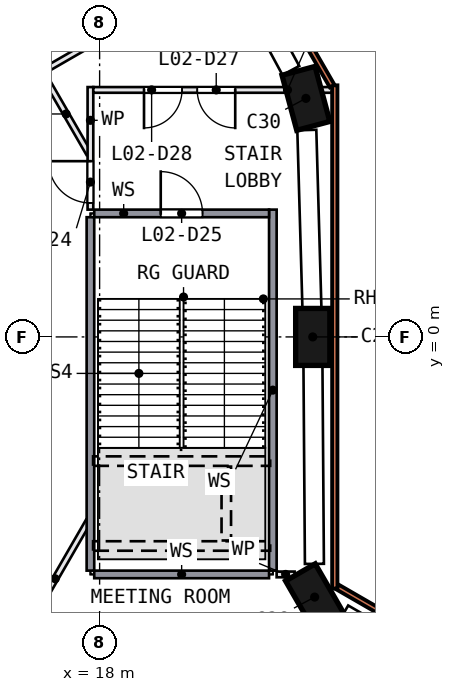
"""IFC4 building model, lengths in metres.
Left out: names, types, materials, properties, quantities, classifications, styles, units other than length and angle.
Written with IfcOpenShell. Run it as: python <this file> out.ifc"""

import sys

from ifc_helpers import new_model, si_unit, direction, frame, frame_2d, origin, origin_2d, place, context, subcontext, project, spatial, rectangle, extrude, element, fill, save


model = new_model("IFC4")
c1 = context("Model", 3, precision=1e-05, world=origin(), true_north=direction((0.0, 1.0)))
c2 = subcontext(c1, "Body", "Model", "MODEL_VIEW")
j1 = project(units=[si_unit("LENGTHUNIT", "METRE"), si_unit("PLANEANGLEUNIT", "RADIAN")], contexts=[c1])
p1 = place(None, origin())
s1 = spatial("IfcSite", under=j1, at=p1, CompositionType="ELEMENT")
p2 = place(p1, origin())
s2 = spatial("IfcBuilding", under=s1, at=p2, CompositionType="ELEMENT")
p3 = place(p2, frame((0.0, 0.0, 14.0)))
s3 = spatial("IfcBuildingStorey", under=s2, at=p3, CompositionType="ELEMENT", Elevation=14.0)
for number, where, z_axis, x_axis in (
    (1, (23.658, -6.846, 0.0), (0.0, 0.0, 1.0), (0.5, -0.866, 0.0)),
    (2, (23.608, 0.0, 0.0), (0.0, 0.0, 1.0), (0.0, 1.0, 0.0)),
    (3, (23.428, 6.278, 0.0), (0.0, 0.0, 1.0), (0.259, -0.966, 0.0)),
):
    element("IfcColumn", number, at=place(p3, frame(where, z_axis=z_axis, x_axis=x_axis)), inside=s3, PredefinedType="COLUMN", context=c2, shape_type="SweptSolid", body=[
        extrude(rectangle(XDim=1.5, YDim=0.9, at=origin_2d()), origin(), (0.0, 0.0, 1.0), 4.55),
    ])
p4 = place(p3, frame((33.751, -12.062, 0.0), z_axis=(0.0, 0.0, 1.0), x_axis=(-0.86602647, 0.499998154, 0.0)))
e4 = element("IfcWall", 4, at=p4, inside=s3, PredefinedType="SOLIDWALL", context=c2, shape_type="SweptSolid", body=[
    extrude(rectangle(XDim=10.961, YDim=0.14, at=frame_2d((5.481, 0.0))), origin(), (0.0, 0.0, 1.0), 4.55),
])
p5 = place(p4, frame((6.702, 0.0, 0.9)))
e5 = element("IfcOpeningElement", 5, at=p5, cuts=e4, PredefinedType="OPENING", context=c2, shape_type="SweptSolid", body=[
    extrude(rectangle(XDim=3.0, YDim=2.7, at=frame_2d((1.5, 1.35))), frame((0.0, 0.08, 0.0), z_axis=(0.0, -1.0, 0.0), x_axis=(1.0, 0.0, 0.0)), (0.0, 0.0, 1.0), 0.16),
])
p6 = place(p3, frame((24.188, -6.621, 0.0), z_axis=(0.0, 0.0, 1.0), x_axis=(0.0, 1.0, 0.0)))
e6 = element("IfcWall", 6, at=p6, inside=s3, PredefinedType="SOLIDWALL", context=c2, shape_type="SweptSolid", body=[
    extrude(rectangle(XDim=13.242, YDim=0.14, at=frame_2d((6.621, 0.0))), origin(), (0.0, 0.0, 1.0), 4.55),
])
p7 = place(p3, frame((24.118, 6.603, 0.0), z_axis=(0.0, 0.0, 1.0), x_axis=(-0.499997984, 0.866026568, 0.0)))
e7 = element("IfcWall", 7, at=p7, inside=s3, PredefinedType="SOLIDWALL", context=c2, shape_type="SweptSolid", body=[
    extrude(rectangle(XDim=12.962, YDim=0.14, at=frame_2d((6.481, 0.0))), origin(), (0.0, 0.0, 1.0), 4.55),
])
p8 = place(p3, frame((16.517, 6.909, 0.0), z_axis=(0.0, 0.0, 1.0), x_axis=(0.499933044, -0.866064057, 0.0)))
e8 = element("IfcWall", 8, at=p8, inside=s3, PredefinedType="PARTITIONING", context=c2, shape_type="SweptSolid", body=[
    extrude(rectangle(XDim=2.408, YDim=0.15, at=frame_2d((1.204, 0.0))), origin(), (0.0, 0.0, 1.0), 4.55),
])
p9 = place(p3, frame((17.858, -6.25, 0.0), z_axis=(0.0, 0.0, 1.0), x_axis=(1.0, 0.0, 0.0)))
e9 = element("IfcWall", 9, at=p9, inside=s3, PredefinedType="SOLIDWALL", context=c2, shape_type="SweptSolid", body=[
    extrude(rectangle(XDim=4.6, YDim=0.2, at=frame_2d((2.3, 0.0))), origin(), (0.0, 0.0, 1.0), 4.55),
])
p10 = place(p3, frame((17.708, -4.845, 0.0), z_axis=(0.0, 0.0, 1.0), x_axis=(-0.499993523, -0.866029143, 0.0)))
e10 = element("IfcWall", 10, at=p10, inside=s3, PredefinedType="PARTITIONING", context=c2, shape_type="SweptSolid", body=[
    extrude(rectangle(XDim=3.508, YDim=0.15, at=frame_2d((1.754, 0.0))), origin(), (0.0, 0.0, 1.0), 4.55),
])
p11 = place(p3, frame((17.758, 3.15, 0.0), z_axis=(0.0, 0.0, 1.0), x_axis=(0.0, -1.0, 0.0)))
e11 = element("IfcWall", 11, at=p11, inside=s3, PredefinedType="SOLIDWALL", context=c2, shape_type="SweptSolid", body=[
    extrude(rectangle(XDim=9.3, YDim=0.2, at=frame_2d((4.65, 0.0))), origin(), (0.0, 0.0, 1.0), 4.55),
])
p12 = place(p3, frame((17.758, 3.35, 0.0), z_axis=(0.0, 0.0, 1.0), x_axis=(0.0, 1.0, 0.0)))
e12 = element("IfcWall", 12, at=p12, inside=s3, PredefinedType="PARTITIONING", context=c2, shape_type="SweptSolid", body=[
    extrude(rectangle(XDim=3.225, YDim=0.15, at=frame_2d((1.613, 0.0))), origin(), (0.0, 0.0, 1.0), 4.55),
])
p13 = place(p12, frame((0.175, 0.0, 0.0)))
e13 = element("IfcOpeningElement", 13, at=p13, cuts=e12, PredefinedType="OPENING", context=c2, shape_type="SweptSolid", body=[
    extrude(rectangle(XDim=1.1, YDim=2.1, at=frame_2d((0.55, 1.05))), frame((0.0, 0.085, 0.0), z_axis=(0.0, -1.0, 0.0), x_axis=(1.0, 0.0, 0.0)), (0.0, 0.0, 1.0), 0.17),
])
p14 = place(p3, frame((21.987, 10.154, 0.0), z_axis=(0.0, 0.0, 1.0), x_axis=(-0.866032921, -0.49998698, 0.0)))
e14 = element("IfcWall", 14, at=p14, inside=s3, PredefinedType="PARTITIONING", context=c2, shape_type="SweptSolid", body=[
    extrude(rectangle(XDim=6.285, YDim=0.15, at=frame_2d((3.143, 0.0))), origin(), (0.0, 0.0, 1.0), 4.55),
])
p15 = place(p3, frame((22.558, -6.15, 0.0), z_axis=(0.0, 0.0, 1.0), x_axis=(0.0, 1.0, 0.0)))
e15 = element("IfcWall", 15, at=p15, inside=s3, PredefinedType="SOLIDWALL", context=c2, shape_type="SweptSolid", body=[
    extrude(rectangle(XDim=9.5, YDim=0.2, at=frame_2d((4.75, 0.0))), origin(), (0.0, 0.0, 1.0), 4.55),
])
p16 = place(p3, frame((22.658, -6.25, 0.0), z_axis=(0.0, 0.0, 1.0), x_axis=(1.0, 0.0, 0.0)))
e16 = element("IfcWall", 16, at=p16, inside=s3, PredefinedType="PARTITIONING", context=c2, shape_type="SweptSolid", body=[
    extrude(rectangle(XDim=0.473, YDim=0.15, at=frame_2d((0.237, 0.0))), origin(), (0.0, 0.0, 1.0), 4.55),
])
p17 = place(p3, frame((17.858, 3.25, 0.0), z_axis=(0.0, 0.0, 1.0), x_axis=(1.0, 0.0, 0.0)))
e17 = element("IfcWall", 17, at=p17, inside=s3, PredefinedType="SOLIDWALL", context=c2, shape_type="SweptSolid", body=[
    extrude(rectangle(XDim=4.6, YDim=0.2, at=frame_2d((2.3, 0.0))), origin(), (0.0, 0.0, 1.0), 4.55),
])
p18 = place(p17, frame((1.75, 0.0, 0.0)))
e18 = element("IfcOpeningElement", 18, at=p18, cuts=e17, PredefinedType="OPENING", context=c2, shape_type="SweptSolid", body=[
    extrude(rectangle(XDim=1.1, YDim=2.1, at=frame_2d((0.55, 1.05))), frame((0.0, 0.11, 0.0), z_axis=(0.0, -1.0, 0.0), x_axis=(1.0, 0.0, 0.0)), (0.0, 0.0, 1.0), 0.22),
])
p19 = place(p3, frame((24.118, 6.5, 0.0), z_axis=(0.0, 0.0, 1.0), x_axis=(-1.0, 0.0, 0.0)))
e19 = element("IfcWall", 19, at=p19, inside=s3, PredefinedType="PARTITIONING", context=c2, shape_type="SweptSolid", body=[
    extrude(rectangle(XDim=6.285, YDim=0.15, at=frame_2d((3.143, 0.0))), origin(), (0.0, 0.0, 1.0), 4.55),
])
p20 = place(p19, frame((2.55, 0.0, 0.0)))
e20 = element("IfcOpeningElement", 20, at=p20, cuts=e19, PredefinedType="OPENING", context=c2, shape_type="SweptSolid", body=[
    extrude(rectangle(XDim=1.0, YDim=2.1, at=frame_2d((0.5, 1.05))), frame((0.0, 0.085, 0.0), z_axis=(0.0, -1.0, 0.0), x_axis=(1.0, 0.0, 0.0)), (0.0, 0.0, 1.0), 0.17),
])
p21 = place(p19, frame((3.95, 0.0, 0.0)))
e21 = element("IfcOpeningElement", 21, at=p21, cuts=e19, PredefinedType="OPENING", context=c2, shape_type="SweptSolid", body=[
    extrude(rectangle(XDim=1.0, YDim=2.1, at=frame_2d((0.5, 1.05))), frame((0.0, 0.085, 0.0), z_axis=(0.0, -1.0, 0.0), x_axis=(1.0, 0.0, 0.0)), (0.0, 0.0, 1.0), 0.17),
])
p22 = place(p13, origin())
e22 = element("IfcDoor", 22, at=p22, inside=s3, OperationType="SINGLE_SWING_RIGHT", PredefinedType="DOOR", context=c2, shape_type="SweptSolid", body=[
    extrude(rectangle(XDim=1.1, YDim=2.1, at=frame_2d((0.55, 1.05))), frame((0.0, 0.025, 0.0), z_axis=(0.0, -1.0, 0.0), x_axis=(1.0, 0.0, 0.0)), (0.0, 0.0, 1.0), 0.05),
])
fill(e13, e22)
p23 = place(p18, origin())
e23 = element("IfcDoor", 23, at=p23, inside=s3, OperationType="SINGLE_SWING_LEFT", PredefinedType="DOOR", context=c2, shape_type="SweptSolid", body=[
    extrude(rectangle(XDim=1.1, YDim=2.1, at=frame_2d((0.55, 1.05))), frame((0.0, 0.025, 0.0), z_axis=(0.0, -1.0, 0.0), x_axis=(1.0, 0.0, 0.0)), (0.0, 0.0, 1.0), 0.05),
])
fill(e18, e23)
p24 = place(p20, origin())
e24 = element("IfcDoor", 24, at=p24, inside=s3, OperationType="SINGLE_SWING_LEFT", PredefinedType="DOOR", context=c2, shape_type="SweptSolid", body=[
    extrude(rectangle(XDim=1.0, YDim=2.1, at=frame_2d((0.5, 1.05))), frame((0.0, 0.025, 0.0), z_axis=(0.0, -1.0, 0.0), x_axis=(1.0, 0.0, 0.0)), (0.0, 0.0, 1.0), 0.05),
])
fill(e20, e24)
p25 = place(p21, origin())
e25 = element("IfcDoor", 25, at=p25, inside=s3, OperationType="SINGLE_SWING_RIGHT", PredefinedType="DOOR", context=c2, shape_type="SweptSolid", body=[
    extrude(rectangle(XDim=1.0, YDim=2.1, at=frame_2d((0.5, 1.05))), frame((0.0, 0.025, 0.0), z_axis=(0.0, -1.0, 0.0), x_axis=(1.0, 0.0, 0.0)), (0.0, 0.0, 1.0), 0.05),
])
fill(e21, e25)
save(model, sys.argv[1])
